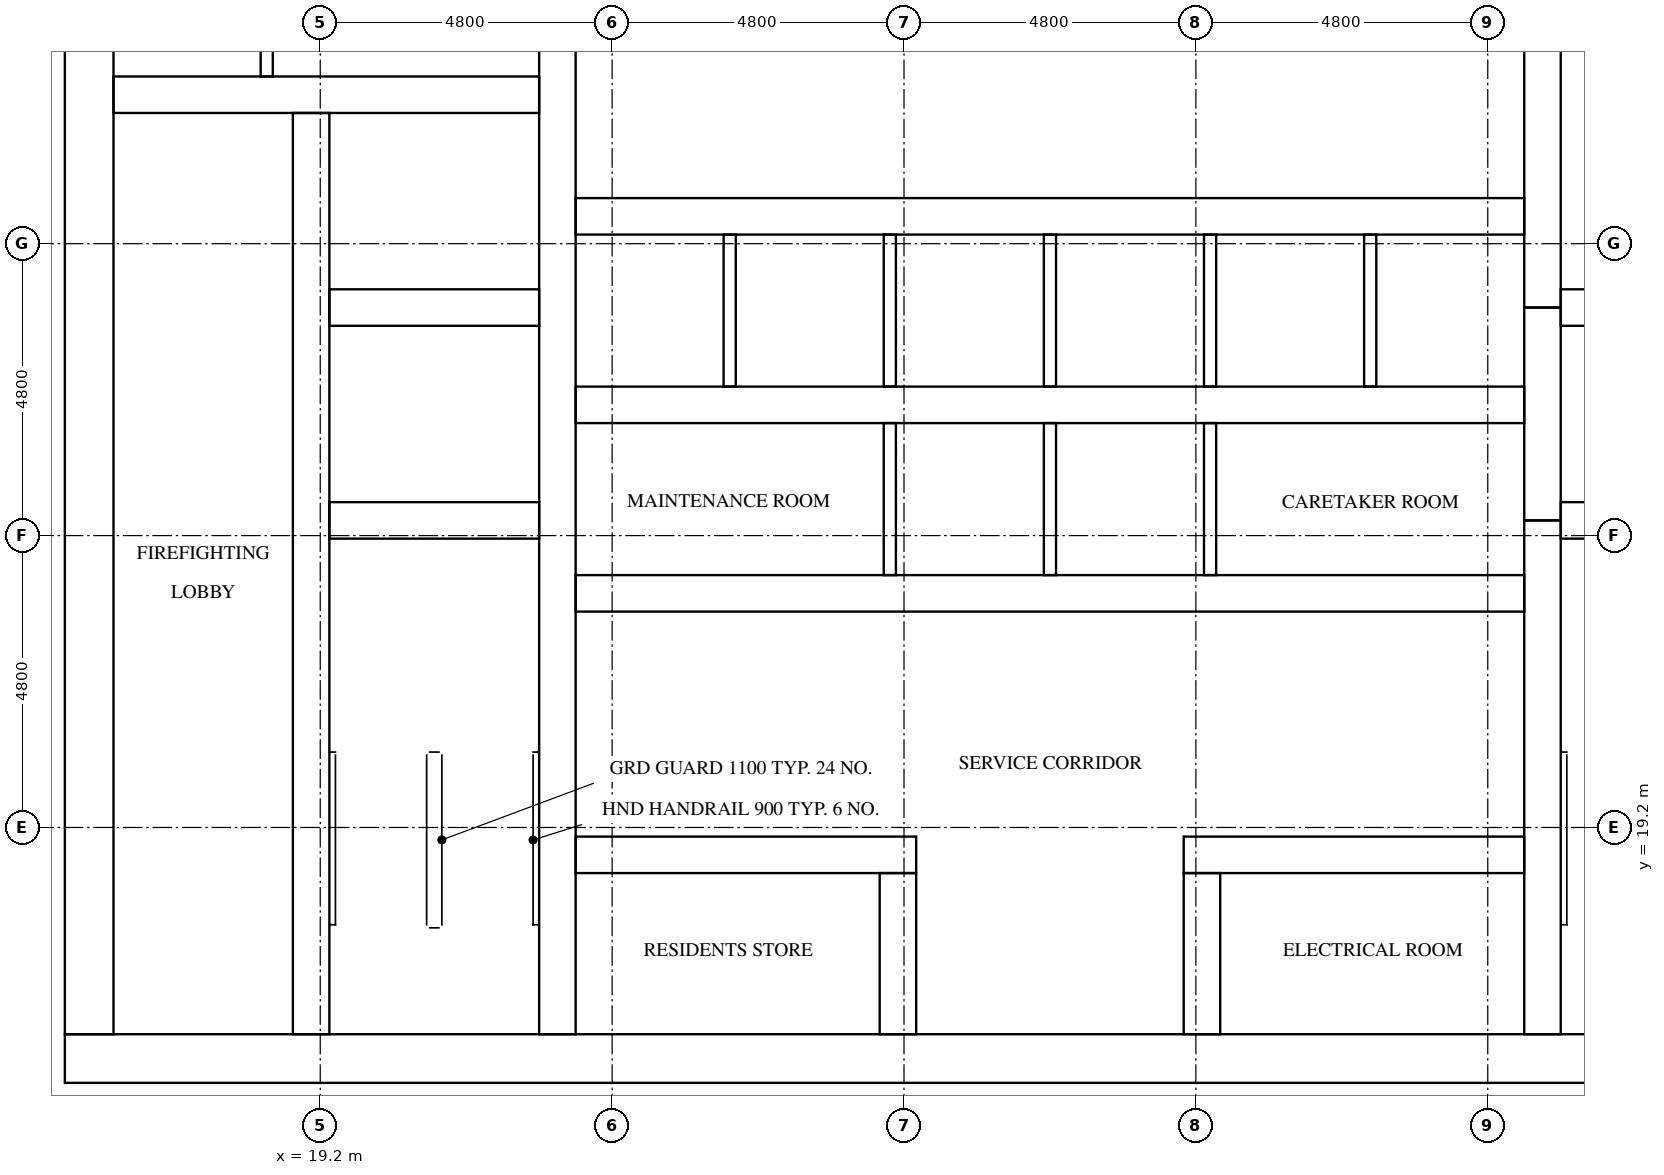
"""IFC4 building model, lengths in metres.
Left out: names, types, materials, properties, quantities, classifications, styles, units other than length and angle.
Written with IfcOpenShell. Run it as: python <this file> out.ifc"""

import sys

from ifc_helpers import new_model, si_unit, direction, frame, frame_2d, origin, place, context, subcontext, project, spatial, rectangle, extrude, element, fill, save


model = new_model("IFC4")
c1 = context("Model", 3, precision=1e-05, world=origin(), true_north=direction((0.0, 1.0)))
c2 = subcontext(c1, "Body", "Model", "MODEL_VIEW")
j1 = project(units=[si_unit("LENGTHUNIT", "METRE"), si_unit("PLANEANGLEUNIT", "RADIAN")], contexts=[c1])
p1 = place(None, origin())
s1 = spatial("IfcSite", under=j1, at=p1, CompositionType="ELEMENT")
p2 = place(p1, origin())
s2 = spatial("IfcBuilding", under=s1, at=p2, CompositionType="ELEMENT")
p3 = place(p2, frame((0.0, 0.0, 163.0)))
s3 = spatial("IfcBuildingStorey", under=s2, at=p3, CompositionType="ELEMENT", Elevation=163.0)
p4 = place(p3, frame((15.0, 15.4, 0.0), z_axis=(0.0, 0.0, 1.0), x_axis=(1.0, 0.0, 0.0)))
e1 = element("IfcWall", 1, at=p4, inside=s3, PredefinedType="SHEAR", context=c2, shape_type="SweptSolid", body=[
    extrude(rectangle(XDim=32.4, YDim=0.8, at=frame_2d((16.2, 0.0))), origin(), (0.0, 0.0, 1.0), 3.2),
])
p5 = place(p4, frame((15.3, 0.0, 0.0)))
e2 = element("IfcOpeningElement", 2, at=p5, cuts=e1, PredefinedType="OPENING", context=c2, shape_type="SweptSolid", body=[
    extrude(rectangle(XDim=1.8, YDim=2.1, at=frame_2d((0.9, 1.05))), frame((0.0, 0.41, 0.0), z_axis=(0.0, -1.0, 0.0), x_axis=(1.0, 0.0, 0.0)), (0.0, 0.0, 1.0), 0.82),
])
p6 = place(p3, frame((15.4, 15.8, 0.0), z_axis=(0.0, 0.0, 1.0), x_axis=(0.0, 1.0, 0.0)))
e3 = element("IfcWall", 3, at=p6, inside=s3, PredefinedType="SHEAR", context=c2, shape_type="SweptSolid", body=[
    extrude(rectangle(XDim=21.2, YDim=0.8, at=frame_2d((10.6, 0.0))), origin(), (0.0, 0.0, 1.0), 3.2),
])
p7 = place(p6, frame((4.96, 0.0, 0.0)))
e4 = element("IfcOpeningElement", 4, at=p7, cuts=e3, PredefinedType="OPENING", context=c2, shape_type="SweptSolid", body=[
    extrude(rectangle(XDim=1.2, YDim=2.1, at=frame_2d((0.6, 1.05))), frame((0.0, 0.41, 0.0), z_axis=(0.0, -1.0, 0.0), x_axis=(1.0, 0.0, 0.0)), (0.0, 0.0, 1.0), 0.82),
])
p8 = place(p3, frame((19.05, 15.8, 0.0), z_axis=(0.0, 0.0, 1.0), x_axis=(0.0, 1.0, 0.0)))
e5 = element("IfcWall", 5, at=p8, inside=s3, PredefinedType="SHEAR", context=c2, shape_type="SweptSolid", body=[
    extrude(rectangle(XDim=15.15, YDim=0.6, at=frame_2d((7.575, 0.0))), origin(), (0.0, 0.0, 1.0), 3.2),
])
p9 = place(p8, frame((9.65, 0.0, 0.0)))
e6 = element("IfcOpeningElement", 6, at=p9, cuts=e5, PredefinedType="OPENING", context=c2, shape_type="SweptSolid", body=[
    extrude(rectangle(XDim=1.1, YDim=2.1, at=frame_2d((0.55, 1.05))), frame((0.0, 0.31, 0.0), z_axis=(0.0, -1.0, 0.0), x_axis=(1.0, 0.0, 0.0)), (0.0, 0.0, 1.0), 0.62),
])
p10 = place(p8, frame((13.15, 0.0, 0.0)))
e7 = element("IfcOpeningElement", 7, at=p10, cuts=e5, PredefinedType="OPENING", context=c2, shape_type="SweptSolid", body=[
    extrude(rectangle(XDim=1.1, YDim=2.1, at=frame_2d((0.55, 1.05))), frame((0.0, 0.31, 0.0), z_axis=(0.0, -1.0, 0.0), x_axis=(1.0, 0.0, 0.0)), (0.0, 0.0, 1.0), 0.62),
])
p11 = place(p8, frame((0.4, 0.0, 0.0)))
e8 = element("IfcOpeningElement", 8, at=p11, cuts=e5, PredefinedType="OPENING", context=c2, shape_type="SweptSolid", body=[
    extrude(rectangle(XDim=1.2, YDim=2.1, at=frame_2d((0.6, 1.05))), frame((0.0, 0.31, 0.0), z_axis=(0.0, -1.0, 0.0), x_axis=(1.0, 0.0, 0.0)), (0.0, 0.0, 1.0), 0.62),
])
p12 = place(p3, frame((23.1, 15.8, 0.0), z_axis=(0.0, 0.0, 1.0), x_axis=(0.0, 1.0, 0.0)))
e9 = element("IfcWall", 9, at=p12, inside=s3, PredefinedType="SHEAR", context=c2, shape_type="SweptSolid", body=[
    extrude(rectangle(XDim=21.2, YDim=0.6, at=frame_2d((10.6, 0.0))), origin(), (0.0, 0.0, 1.0), 3.2),
])
p13 = place(p3, frame((39.3, 15.8, 0.0), z_axis=(0.0, 0.0, 1.0), x_axis=(0.0, 1.0, 0.0)))
e10 = element("IfcWall", 10, at=p13, inside=s3, PredefinedType="SHEAR", context=c2, shape_type="SweptSolid", body=[
    extrude(rectangle(XDim=8.45, YDim=0.6, at=frame_2d((4.225, 0.0))), origin(), (0.0, 0.0, 1.0), 3.2),
])
p14 = place(p3, frame((39.3, 24.25, 0.0), z_axis=(0.0, 0.0, 1.0), x_axis=(0.0, 1.0, 0.0)))
e11 = element("IfcWall", 11, at=p14, inside=s3, PredefinedType="SHEAR", context=c2, shape_type="SweptSolid", body=[
    extrude(rectangle(XDim=3.5, YDim=0.6, at=frame_2d((1.75, 0.0))), origin(), (0.0, 0.0, 1.0), 3.2),
])
p15 = place(p3, frame((39.3, 27.75, 0.0), z_axis=(0.0, 0.0, 1.0), x_axis=(0.0, 1.0, 0.0)))
e12 = element("IfcWall", 12, at=p15, inside=s3, PredefinedType="SHEAR", context=c2, shape_type="SweptSolid", body=[
    extrude(rectangle(XDim=9.25, YDim=0.6, at=frame_2d((4.625, 0.0))), origin(), (0.0, 0.0, 1.0), 3.2),
])
for number, where, z_axis, x_axis in (
    (13, (19.35, 24.25, 0.0), (0.0, 0.0, 1.0), (1.0, 0.0, 0.0)),
    (14, (19.35, 27.75, 0.0), (0.0, 0.0, 1.0), (1.0, 0.0, 0.0)),
):
    element("IfcWall", number, at=place(p3, frame(where, z_axis=z_axis, x_axis=x_axis)), inside=s3, PredefinedType="SHEAR", context=c2, shape_type="SweptSolid", body=[
        extrude(rectangle(XDim=3.45, YDim=0.6, at=frame_2d((1.725, 0.0))), origin(), (0.0, 0.0, 1.0), 3.2),
    ])
p16 = place(p3, frame((15.8, 31.25, 0.0), z_axis=(0.0, 0.0, 1.0), x_axis=(1.0, 0.0, 0.0)))
e15 = element("IfcWall", 15, at=p16, inside=s3, PredefinedType="SHEAR", context=c2, shape_type="SweptSolid", body=[
    extrude(rectangle(XDim=7.0, YDim=0.6, at=frame_2d((3.5, 0.0))), origin(), (0.0, 0.0, 1.0), 3.2),
])
for number, where, z_axis, x_axis in (
    (16, (39.6, 24.25, 0.0), (0.0, 0.0, 1.0), (1.0, 0.0, 0.0)),
    (17, (39.6, 27.75, 0.0), (0.0, 0.0, 1.0), (1.0, 0.0, 0.0)),
):
    element("IfcWall", number, at=place(p3, frame(where, z_axis=z_axis, x_axis=x_axis)), inside=s3, PredefinedType="SHEAR", context=c2, shape_type="SweptSolid", body=[
        extrude(rectangle(XDim=3.45, YDim=0.6, at=frame_2d((1.725, 0.0))), origin(), (0.0, 0.0, 1.0), 3.2),
    ])
p17 = place(p3, frame((23.4, 18.75, 0.0), z_axis=(0.0, 0.0, 1.0), x_axis=(1.0, 0.0, 0.0)))
e18 = element("IfcWall", 18, at=p17, inside=s3, PredefinedType="SHEAR", context=c2, shape_type="SweptSolid", body=[
    extrude(rectangle(XDim=5.6, YDim=0.6, at=frame_2d((2.8, 0.0))), origin(), (0.0, 0.0, 1.0), 3.2),
])
p18 = place(p17, frame((2.0, 0.0, 0.0)))
e19 = element("IfcOpeningElement", 19, at=p18, cuts=e18, PredefinedType="OPENING", context=c2, shape_type="SweptSolid", body=[
    extrude(rectangle(XDim=1.0, YDim=2.1, at=frame_2d((0.5, 1.05))), frame((0.0, 0.31, 0.0), z_axis=(0.0, -1.0, 0.0), x_axis=(1.0, 0.0, 0.0)), (0.0, 0.0, 1.0), 0.62),
])
p19 = place(p3, frame((33.4, 18.75, 0.0), z_axis=(0.0, 0.0, 1.0), x_axis=(1.0, 0.0, 0.0)))
e20 = element("IfcWall", 20, at=p19, inside=s3, PredefinedType="SHEAR", context=c2, shape_type="SweptSolid", body=[
    extrude(rectangle(XDim=5.6, YDim=0.6, at=frame_2d((2.8, 0.0))), origin(), (0.0, 0.0, 1.0), 3.2),
])
p20 = place(p19, frame((2.6, 0.0, 0.0)))
e21 = element("IfcOpeningElement", 21, at=p20, cuts=e20, PredefinedType="OPENING", context=c2, shape_type="SweptSolid", body=[
    extrude(rectangle(XDim=1.0, YDim=2.1, at=frame_2d((0.5, 1.05))), frame((0.0, 0.31, 0.0), z_axis=(0.0, -1.0, 0.0), x_axis=(1.0, 0.0, 0.0)), (0.0, 0.0, 1.0), 0.62),
])
p21 = place(p3, frame((23.4, 23.05, 0.0), z_axis=(0.0, 0.0, 1.0), x_axis=(1.0, 0.0, 0.0)))
e22 = element("IfcWall", 22, at=p21, inside=s3, PredefinedType="SHEAR", context=c2, shape_type="SweptSolid", body=[
    extrude(rectangle(XDim=15.6, YDim=0.6, at=frame_2d((7.8, 0.0))), origin(), (0.0, 0.0, 1.0), 3.2),
])
p22 = place(p21, frame((2.033, 0.0, 0.0)))
e23 = element("IfcOpeningElement", 23, at=p22, cuts=e22, PredefinedType="OPENING", context=c2, shape_type="SweptSolid", body=[
    extrude(rectangle(XDim=1.0, YDim=2.1, at=frame_2d((0.5, 1.05))), frame((0.0, 0.31, 0.0), z_axis=(0.0, -1.0, 0.0), x_axis=(1.0, 0.0, 0.0)), (0.0, 0.0, 1.0), 0.62),
])
p23 = place(p21, frame((12.567, 0.0, 0.0)))
e24 = element("IfcOpeningElement", 24, at=p23, cuts=e22, PredefinedType="OPENING", context=c2, shape_type="SweptSolid", body=[
    extrude(rectangle(XDim=1.0, YDim=2.1, at=frame_2d((0.5, 1.05))), frame((0.0, 0.31, 0.0), z_axis=(0.0, -1.0, 0.0), x_axis=(1.0, 0.0, 0.0)), (0.0, 0.0, 1.0), 0.62),
])
p24 = place(p3, frame((23.4, 26.15, 0.0), z_axis=(0.0, 0.0, 1.0), x_axis=(1.0, 0.0, 0.0)))
e25 = element("IfcWall", 25, at=p24, inside=s3, PredefinedType="SHEAR", context=c2, shape_type="SweptSolid", body=[
    extrude(rectangle(XDim=15.6, YDim=0.6, at=frame_2d((7.8, 0.0))), origin(), (0.0, 0.0, 1.0), 3.2),
])
p25 = place(p3, frame((23.4, 29.25, 0.0), z_axis=(0.0, 0.0, 1.0), x_axis=(1.0, 0.0, 0.0)))
e26 = element("IfcWall", 26, at=p25, inside=s3, PredefinedType="SHEAR", context=c2, shape_type="SweptSolid", body=[
    extrude(rectangle(XDim=15.6, YDim=0.6, at=frame_2d((7.8, 0.0))), origin(), (0.0, 0.0, 1.0), 3.2),
])
p26 = place(p25, frame((0.667, 0.0, 0.0)))
e27 = element("IfcOpeningElement", 27, at=p26, cuts=e26, PredefinedType="OPENING", context=c2, shape_type="SweptSolid", body=[
    extrude(rectangle(XDim=1.1, YDim=2.1, at=frame_2d((0.55, 1.05))), frame((0.0, 0.31, 0.0), z_axis=(0.0, -1.0, 0.0), x_axis=(1.0, 0.0, 0.0)), (0.0, 0.0, 1.0), 0.62),
])
p27 = place(p25, frame((3.3, 0.0, 0.0)))
e28 = element("IfcOpeningElement", 28, at=p27, cuts=e26, PredefinedType="OPENING", context=c2, shape_type="SweptSolid", body=[
    extrude(rectangle(XDim=1.1, YDim=2.1, at=frame_2d((0.55, 1.05))), frame((0.0, 0.31, 0.0), z_axis=(0.0, -1.0, 0.0), x_axis=(1.0, 0.0, 0.0)), (0.0, 0.0, 1.0), 0.62),
])
p28 = place(p25, frame((5.933, 0.0, 0.0)))
e29 = element("IfcOpeningElement", 29, at=p28, cuts=e26, PredefinedType="OPENING", context=c2, shape_type="SweptSolid", body=[
    extrude(rectangle(XDim=1.1, YDim=2.1, at=frame_2d((0.55, 1.05))), frame((0.0, 0.31, 0.0), z_axis=(0.0, -1.0, 0.0), x_axis=(1.0, 0.0, 0.0)), (0.0, 0.0, 1.0), 0.62),
])
p29 = place(p25, frame((8.567, 0.0, 0.0)))
e30 = element("IfcOpeningElement", 30, at=p29, cuts=e26, PredefinedType="OPENING", context=c2, shape_type="SweptSolid", body=[
    extrude(rectangle(XDim=1.1, YDim=2.1, at=frame_2d((0.55, 1.05))), frame((0.0, 0.31, 0.0), z_axis=(0.0, -1.0, 0.0), x_axis=(1.0, 0.0, 0.0)), (0.0, 0.0, 1.0), 0.62),
])
p30 = place(p25, frame((11.2, 0.0, 0.0)))
e31 = element("IfcOpeningElement", 31, at=p30, cuts=e26, PredefinedType="OPENING", context=c2, shape_type="SweptSolid", body=[
    extrude(rectangle(XDim=1.1, YDim=2.1, at=frame_2d((0.55, 1.05))), frame((0.0, 0.31, 0.0), z_axis=(0.0, -1.0, 0.0), x_axis=(1.0, 0.0, 0.0)), (0.0, 0.0, 1.0), 0.62),
])
p31 = place(p25, frame((13.833, 0.0, 0.0)))
e32 = element("IfcOpeningElement", 32, at=p31, cuts=e26, PredefinedType="OPENING", context=c2, shape_type="SweptSolid", body=[
    extrude(rectangle(XDim=1.1, YDim=2.1, at=frame_2d((0.55, 1.05))), frame((0.0, 0.31, 0.0), z_axis=(0.0, -1.0, 0.0), x_axis=(1.0, 0.0, 0.0)), (0.0, 0.0, 1.0), 0.62),
])
for number, where, z_axis, x_axis in (
    (33, (28.7, 15.8, 0.0), (0.0, 0.0, 1.0), (0.0, 1.0, 0.0)),
    (34, (33.7, 15.8, 0.0), (0.0, 0.0, 1.0), (0.0, 1.0, 0.0)),
):
    element("IfcWall", number, at=place(p3, frame(where, z_axis=z_axis, x_axis=x_axis)), inside=s3, PredefinedType="SHEAR", context=c2, shape_type="SweptSolid", body=[
        extrude(rectangle(XDim=2.65, YDim=0.6, at=frame_2d((1.325, 0.0))), origin(), (0.0, 0.0, 1.0), 3.2),
    ])
for number, where, z_axis, x_axis in (
    (35, (25.933, 26.45, 0.0), (0.0, 0.0, 1.0), (0.0, 1.0, 0.0)),
    (36, (28.567, 23.35, 0.0), (0.0, 0.0, 1.0), (0.0, 1.0, 0.0)),
    (37, (28.567, 26.45, 0.0), (0.0, 0.0, 1.0), (0.0, 1.0, 0.0)),
    (38, (31.2, 23.35, 0.0), (0.0, 0.0, 1.0), (0.0, 1.0, 0.0)),
    (39, (31.2, 26.45, 0.0), (0.0, 0.0, 1.0), (0.0, 1.0, 0.0)),
    (40, (33.833, 23.35, 0.0), (0.0, 0.0, 1.0), (0.0, 1.0, 0.0)),
    (41, (33.833, 26.45, 0.0), (0.0, 0.0, 1.0), (0.0, 1.0, 0.0)),
    (42, (36.467, 26.45, 0.0), (0.0, 0.0, 1.0), (0.0, 1.0, 0.0)),
):
    element("IfcWall", number, at=place(p3, frame(where, z_axis=z_axis, x_axis=x_axis)), inside=s3, PredefinedType="SOLIDWALL", context=c2, shape_type="SweptSolid", body=[
        extrude(rectangle(XDim=2.5, YDim=0.2, at=frame_2d((1.25, 0.0))), origin(), (0.0, 0.0, 1.0), 3.2),
    ])
p32 = place(p3, frame((18.32, 31.55, 0.0), z_axis=(0.0, 0.0, 1.0), x_axis=(0.0, 1.0, 0.0)))
e43 = element("IfcWall", 43, at=p32, inside=s3, PredefinedType="PARTITIONING", context=c2, shape_type="SweptSolid", body=[
    extrude(rectangle(XDim=5.45, YDim=0.2, at=frame_2d((2.725, 0.0))), origin(), (0.0, 0.0, 1.0), 3.2),
])
p33 = place(p26, origin())
e44 = element("IfcDoor", 44, at=p33, inside=s3, OperationType="DOUBLE_DOOR_SLIDING", PredefinedType="DOOR", context=c2, shape_type="SweptSolid", body=[
    extrude(rectangle(XDim=1.1, YDim=2.1, at=frame_2d((0.55, 1.05))), frame((0.0, 0.025, 0.0), z_axis=(0.0, -1.0, 0.0), x_axis=(1.0, 0.0, 0.0)), (0.0, 0.0, 1.0), 0.05),
])
fill(e27, e44)
p34 = place(p27, origin())
e45 = element("IfcDoor", 45, at=p34, inside=s3, OperationType="DOUBLE_DOOR_SLIDING", PredefinedType="DOOR", context=c2, shape_type="SweptSolid", body=[
    extrude(rectangle(XDim=1.1, YDim=2.1, at=frame_2d((0.55, 1.05))), frame((0.0, 0.025, 0.0), z_axis=(0.0, -1.0, 0.0), x_axis=(1.0, 0.0, 0.0)), (0.0, 0.0, 1.0), 0.05),
])
fill(e28, e45)
p35 = place(p28, origin())
e46 = element("IfcDoor", 46, at=p35, inside=s3, OperationType="DOUBLE_DOOR_SLIDING", PredefinedType="DOOR", context=c2, shape_type="SweptSolid", body=[
    extrude(rectangle(XDim=1.1, YDim=2.1, at=frame_2d((0.55, 1.05))), frame((0.0, 0.025, 0.0), z_axis=(0.0, -1.0, 0.0), x_axis=(1.0, 0.0, 0.0)), (0.0, 0.0, 1.0), 0.05),
])
fill(e29, e46)
p36 = place(p29, origin())
e47 = element("IfcDoor", 47, at=p36, inside=s3, OperationType="DOUBLE_DOOR_SLIDING", PredefinedType="DOOR", context=c2, shape_type="SweptSolid", body=[
    extrude(rectangle(XDim=1.1, YDim=2.1, at=frame_2d((0.55, 1.05))), frame((0.0, 0.025, 0.0), z_axis=(0.0, -1.0, 0.0), x_axis=(1.0, 0.0, 0.0)), (0.0, 0.0, 1.0), 0.05),
])
fill(e30, e47)
p37 = place(p30, origin())
e48 = element("IfcDoor", 48, at=p37, inside=s3, OperationType="DOUBLE_DOOR_SLIDING", PredefinedType="DOOR", context=c2, shape_type="SweptSolid", body=[
    extrude(rectangle(XDim=1.1, YDim=2.1, at=frame_2d((0.55, 1.05))), frame((0.0, 0.025, 0.0), z_axis=(0.0, -1.0, 0.0), x_axis=(1.0, 0.0, 0.0)), (0.0, 0.0, 1.0), 0.05),
])
fill(e31, e48)
p38 = place(p31, origin())
e49 = element("IfcDoor", 49, at=p38, inside=s3, OperationType="DOUBLE_DOOR_SLIDING", PredefinedType="DOOR", context=c2, shape_type="SweptSolid", body=[
    extrude(rectangle(XDim=1.1, YDim=2.1, at=frame_2d((0.55, 1.05))), frame((0.0, 0.025, 0.0), z_axis=(0.0, -1.0, 0.0), x_axis=(1.0, 0.0, 0.0)), (0.0, 0.0, 1.0), 0.05),
])
fill(e32, e49)
p39 = place(p9, origin())
e50 = element("IfcDoor", 50, at=p39, inside=s3, OperationType="DOUBLE_DOOR_SLIDING", PredefinedType="DOOR", context=c2, shape_type="SweptSolid", body=[
    extrude(rectangle(XDim=1.1, YDim=2.1, at=frame_2d((0.55, 1.05))), frame((0.0, 0.025, 0.0), z_axis=(0.0, -1.0, 0.0), x_axis=(1.0, 0.0, 0.0)), (0.0, 0.0, 1.0), 0.05),
])
fill(e6, e50)
p40 = place(p10, origin())
e51 = element("IfcDoor", 51, at=p40, inside=s3, OperationType="DOUBLE_DOOR_SLIDING", PredefinedType="DOOR", context=c2, shape_type="SweptSolid", body=[
    extrude(rectangle(XDim=1.1, YDim=2.1, at=frame_2d((0.55, 1.05))), frame((0.0, 0.025, 0.0), z_axis=(0.0, -1.0, 0.0), x_axis=(1.0, 0.0, 0.0)), (0.0, 0.0, 1.0), 0.05),
])
fill(e7, e51)
p41 = place(p11, frame((1.2, 0.0, 0.0), z_axis=(0.0, 0.0, 1.0), x_axis=(-1.0, 0.0, 0.0)))
e52 = element("IfcDoor", 52, at=p41, inside=s3, OperationType="SINGLE_SWING_RIGHT", PredefinedType="DOOR", context=c2, shape_type="SweptSolid", body=[
    extrude(rectangle(XDim=1.2, YDim=2.1, at=frame_2d((0.6, 1.05))), frame((0.0, 0.025, 0.0), z_axis=(0.0, -1.0, 0.0), x_axis=(1.0, 0.0, 0.0)), (0.0, 0.0, 1.0), 0.05),
])
fill(e8, e52)
p42 = place(p5, frame((1.8, 0.0, 0.0), z_axis=(0.0, 0.0, 1.0), x_axis=(-1.0, 0.0, 0.0)))
e53 = element("IfcDoor", 53, at=p42, inside=s3, OperationType="DOUBLE_DOOR_SINGLE_SWING", PredefinedType="DOOR", context=c2, shape_type="SweptSolid", body=[
    extrude(rectangle(XDim=1.8, YDim=2.1, at=frame_2d((0.9, 1.05))), frame((0.0, 0.025, 0.0), z_axis=(0.0, -1.0, 0.0), x_axis=(1.0, 0.0, 0.0)), (0.0, 0.0, 1.0), 0.05),
])
fill(e2, e53)
p43 = place(p7, frame((1.2, 0.0, 0.0), z_axis=(0.0, 0.0, 1.0), x_axis=(-1.0, 0.0, 0.0)))
e54 = element("IfcDoor", 54, at=p43, inside=s3, OperationType="SINGLE_SWING_LEFT", PredefinedType="DOOR", context=c2, shape_type="SweptSolid", body=[
    extrude(rectangle(XDim=1.2, YDim=2.1, at=frame_2d((0.6, 1.05))), frame((0.0, 0.025, 0.0), z_axis=(0.0, -1.0, 0.0), x_axis=(1.0, 0.0, 0.0)), (0.0, 0.0, 1.0), 0.05),
])
fill(e4, e54)
p44 = place(p22, frame((1.0, 0.0, 0.0), z_axis=(0.0, 0.0, 1.0), x_axis=(-1.0, 0.0, 0.0)))
e55 = element("IfcDoor", 55, at=p44, inside=s3, OperationType="SINGLE_SWING_LEFT", PredefinedType="DOOR", context=c2, shape_type="SweptSolid", body=[
    extrude(rectangle(XDim=1.0, YDim=2.1, at=frame_2d((0.5, 1.05))), frame((0.0, 0.025, 0.0), z_axis=(0.0, -1.0, 0.0), x_axis=(1.0, 0.0, 0.0)), (0.0, 0.0, 1.0), 0.05),
])
fill(e23, e55)
p45 = place(p23, frame((1.0, 0.0, 0.0), z_axis=(0.0, 0.0, 1.0), x_axis=(-1.0, 0.0, 0.0)))
e56 = element("IfcDoor", 56, at=p45, inside=s3, OperationType="SINGLE_SWING_RIGHT", PredefinedType="DOOR", context=c2, shape_type="SweptSolid", body=[
    extrude(rectangle(XDim=1.0, YDim=2.1, at=frame_2d((0.5, 1.05))), frame((0.0, 0.025, 0.0), z_axis=(0.0, -1.0, 0.0), x_axis=(1.0, 0.0, 0.0)), (0.0, 0.0, 1.0), 0.05),
])
fill(e24, e56)
p46 = place(p18, origin())
e57 = element("IfcDoor", 57, at=p46, inside=s3, OperationType="SINGLE_SWING_LEFT", PredefinedType="DOOR", context=c2, shape_type="SweptSolid", body=[
    extrude(rectangle(XDim=1.0, YDim=2.1, at=frame_2d((0.5, 1.05))), frame((0.0, 0.025, 0.0), z_axis=(0.0, -1.0, 0.0), x_axis=(1.0, 0.0, 0.0)), (0.0, 0.0, 1.0), 0.05),
])
fill(e19, e57)
p47 = place(p20, origin())
e58 = element("IfcDoor", 58, at=p47, inside=s3, OperationType="SINGLE_SWING_RIGHT", PredefinedType="DOOR", context=c2, shape_type="SweptSolid", body=[
    extrude(rectangle(XDim=1.0, YDim=2.1, at=frame_2d((0.5, 1.05))), frame((0.0, 0.025, 0.0), z_axis=(0.0, -1.0, 0.0), x_axis=(1.0, 0.0, 0.0)), (0.0, 0.0, 1.0), 0.05),
])
fill(e21, e58)
save(model, sys.argv[1])
